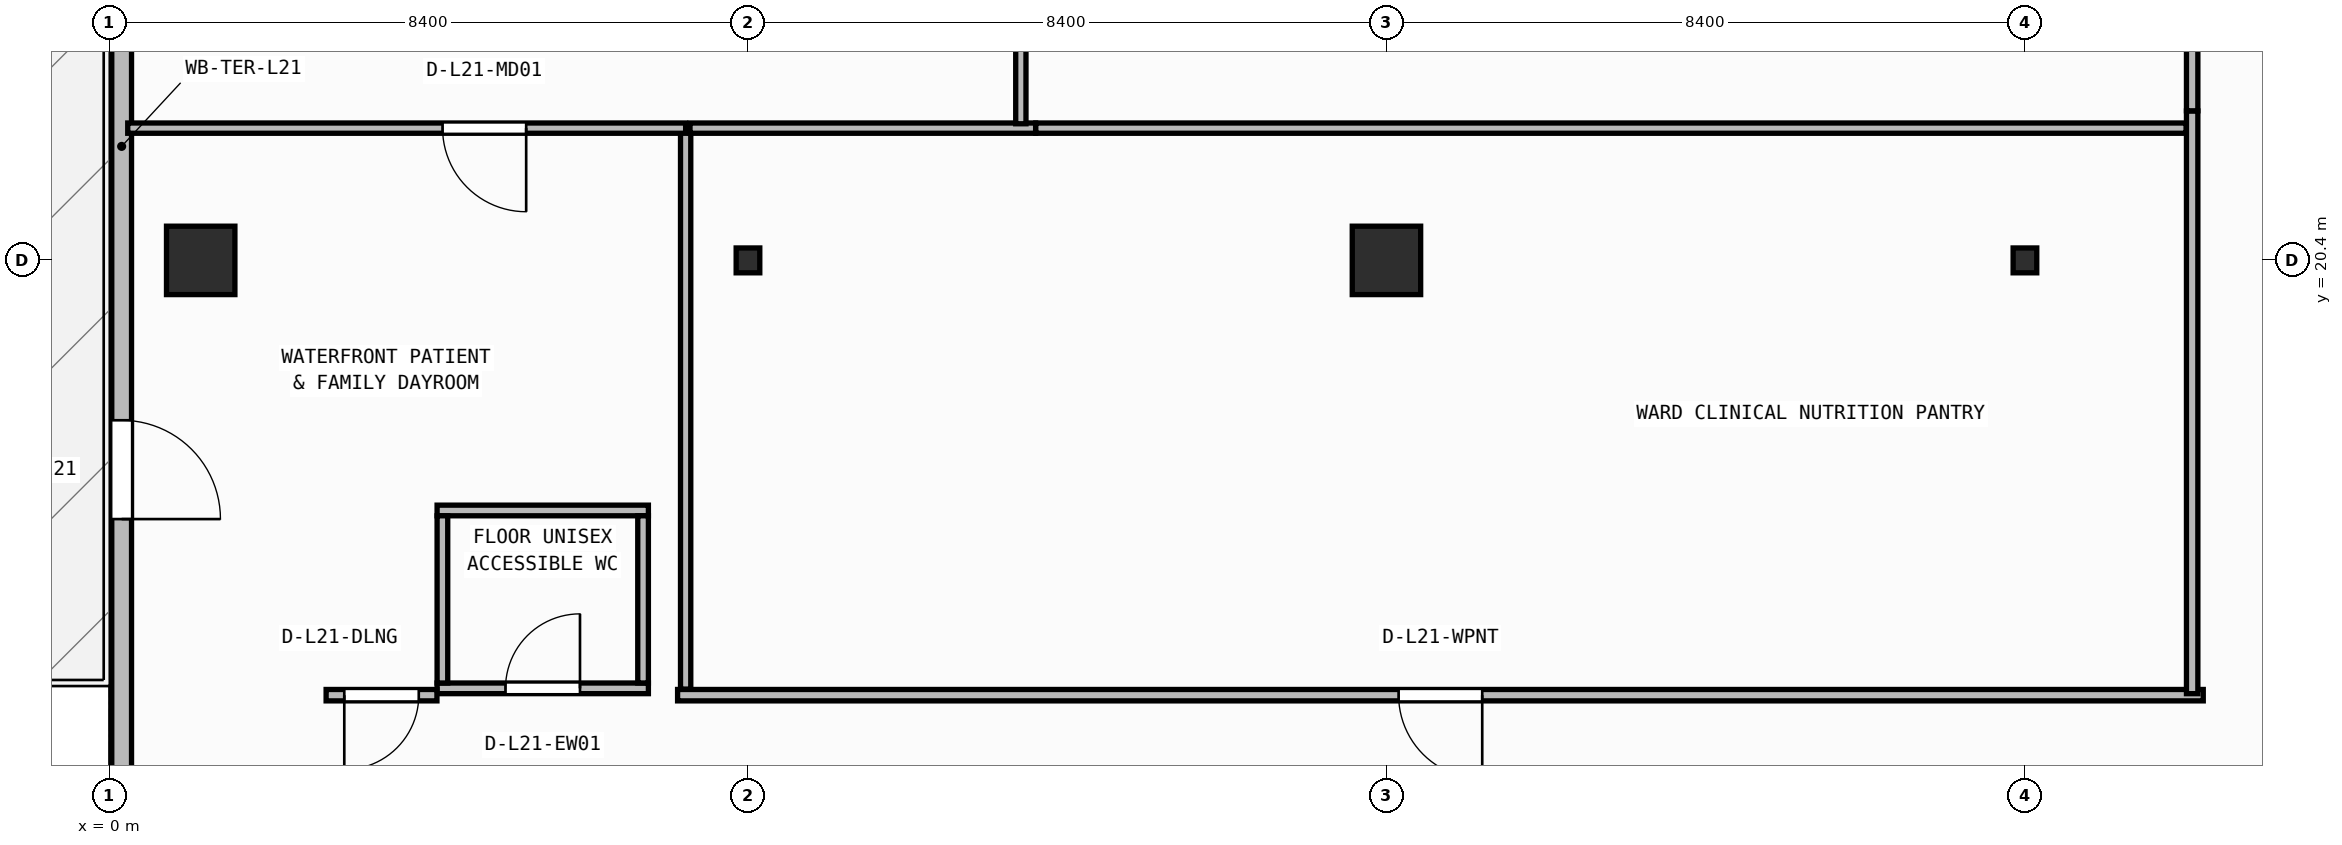
"""IFC4 building model, lengths in metres.
Left out: names, types, materials, properties, quantities, classifications, styles, units other than length and angle.
Written with IfcOpenShell. Run it as: python <this file> out.ifc"""

import sys

from ifc_helpers import new_model, si_unit, direction, frame, frame_2d, origin, origin_2d, place, context, subcontext, project, spatial, rectangle, i_section, extrude, element, fill, save


model = new_model("IFC4")
c1 = context("Model", 3, precision=1e-05, world=origin(), true_north=direction((0.0, 1.0)))
c2 = subcontext(c1, "Body", "Model", "MODEL_VIEW")
j1 = project(units=[si_unit("LENGTHUNIT", "METRE"), si_unit("PLANEANGLEUNIT", "RADIAN")], contexts=[c1])
p1 = place(None, origin())
s1 = spatial("IfcSite", under=j1, at=p1, CompositionType="ELEMENT")
p2 = place(p1, origin())
s2 = spatial("IfcBuilding", under=s1, at=p2, CompositionType="ELEMENT")
p3 = place(p2, frame((0.0, 0.0, 85.7)))
s3 = spatial("IfcBuildingStorey", under=s2, at=p3, CompositionType="ELEMENT", Elevation=85.7)
p4 = place(p3, frame((1.2, 20.4, 0.0), z_axis=(0.0, 0.0, 1.0), x_axis=(1.0, 0.0, 0.0)))
e1 = element("IfcColumn", 1, at=p4, inside=s3, PredefinedType="COLUMN", context=c2, shape_type="SweptSolid", body=[
    extrude(rectangle(XDim=0.9, YDim=0.9, at=origin_2d()), origin(), (0.0, 0.0, 1.0), 3.95),
])
p5 = place(p3, frame((8.4, 20.4, 0.0), z_axis=(0.0, 0.0, 1.0), x_axis=(1.0, 0.0, 0.0)))
e2 = element("IfcColumn", 2, at=p5, inside=s3, PredefinedType="COLUMN", context=c2, shape_type="SweptSolid", body=[
    extrude(i_section(OverallWidth=0.311, OverallDepth=0.327, WebThickness=0.016, FlangeThickness=0.025, FilletRadius=0.017, at=origin_2d()), origin(), (0.0, 0.0, 1.0), 3.95),
])
p6 = place(p3, frame((16.8, 20.4, 0.0), z_axis=(0.0, 0.0, 1.0), x_axis=(1.0, 0.0, 0.0)))
e3 = element("IfcColumn", 3, at=p6, inside=s3, PredefinedType="COLUMN", context=c2, shape_type="SweptSolid", body=[
    extrude(rectangle(XDim=0.9, YDim=0.9, at=origin_2d()), origin(), (0.0, 0.0, 1.0), 3.95),
])
p7 = place(p3, frame((25.2, 20.4, 0.0), z_axis=(0.0, 0.0, 1.0), x_axis=(1.0, 0.0, 0.0)))
e4 = element("IfcColumn", 4, at=p7, inside=s3, PredefinedType="COLUMN", context=c2, shape_type="SweptSolid", body=[
    extrude(i_section(OverallWidth=0.311, OverallDepth=0.327, WebThickness=0.016, FlangeThickness=0.025, FilletRadius=0.017, at=origin_2d()), origin(), (0.0, 0.0, 1.0), 3.95),
])
p8 = place(p3, frame((0.16, 41.04, 0.0), z_axis=(0.0, 0.0, 1.0), x_axis=(0.0, -1.0, 0.0)))
e5 = element("IfcWall", 5, at=p8, inside=s3, PredefinedType="STANDARD", context=c2, shape_type="SweptSolid", body=[
    extrude(rectangle(XDim=38.28, YDim=0.26, at=frame_2d((19.14, 0.0))), origin(), (0.0, 0.0, 1.0), 3.71),
])
p9 = place(p8, frame((22.743, 0.0, 0.0)))
e6 = element("IfcOpeningElement", 6, at=p9, cuts=e5, PredefinedType="OPENING", context=c2, shape_type="SweptSolid", body=[
    extrude(rectangle(XDim=1.3, YDim=2.15, at=frame_2d((0.65, 1.075))), frame((0.0, 0.14, 0.0), z_axis=(0.0, -1.0, 0.0), x_axis=(1.0, 0.0, 0.0)), (0.0, 0.0, 1.0), 0.28),
])
p10 = place(p3, frame((4.31, 14.77, 0.0), z_axis=(0.0, 0.0, 1.0), x_axis=(1.0, 0.0, 0.0)))
e7 = element("IfcWall", 7, at=p10, inside=s3, PredefinedType="PARTITIONING", context=c2, shape_type="SweptSolid", body=[
    extrude(rectangle(XDim=2.78, YDim=0.14, at=frame_2d((1.39, 0.0))), origin(), (0.0, 0.0, 1.0), 3.71),
])
p11 = place(p10, frame((0.9, 0.0, 0.0)))
e8 = element("IfcOpeningElement", 8, at=p11, cuts=e7, PredefinedType="OPENING", context=c2, shape_type="SweptSolid", body=[
    extrude(rectangle(XDim=0.98, YDim=2.1, at=frame_2d((0.49, 1.05))), frame((0.0, 0.08, 0.0), z_axis=(0.0, -1.0, 0.0), x_axis=(1.0, 0.0, 0.0)), (0.0, 0.0, 1.0), 0.16),
])
p12 = place(p3, frame((4.31, 17.11, 0.0), z_axis=(0.0, 0.0, 1.0), x_axis=(1.0, 0.0, 0.0)))
e9 = element("IfcWall", 9, at=p12, inside=s3, PredefinedType="PARTITIONING", context=c2, shape_type="SweptSolid", body=[
    extrude(rectangle(XDim=2.78, YDim=0.14, at=frame_2d((1.39, 0.0))), origin(), (0.0, 0.0, 1.0), 3.71),
])
for number, where, z_axis, x_axis in (
    (10, (4.38, 14.84, 0.0), (0.0, 0.0, 1.0), (0.0, 1.0, 0.0)),
    (11, (7.02, 14.84, 0.0), (0.0, 0.0, 1.0), (0.0, 1.0, 0.0)),
):
    element("IfcWall", number, at=place(p3, frame(where, z_axis=z_axis, x_axis=x_axis)), inside=s3, PredefinedType="PARTITIONING", context=c2, shape_type="SweptSolid", body=[
        extrude(rectangle(XDim=2.2, YDim=0.14, at=frame_2d((1.1, 0.0))), origin(), (0.0, 0.0, 1.0), 3.71),
    ])
p13 = place(p3, frame((4.308, 14.68, 0.0), z_axis=(0.0, 0.0, 1.0), x_axis=(-1.0, 0.0, 0.0)))
e12 = element("IfcWall", 12, at=p13, inside=s3, PredefinedType="PARTITIONING", context=c2, shape_type="SweptSolid", body=[
    extrude(rectangle(XDim=1.458, YDim=0.15, at=frame_2d((0.729, 0.0))), origin(), (0.0, 0.0, 1.0), 3.71),
])
p14 = place(p13, frame((0.239, 0.0, 0.0)))
e13 = element("IfcOpeningElement", 13, at=p14, cuts=e12, PredefinedType="OPENING", context=c2, shape_type="SweptSolid", body=[
    extrude(rectangle(XDim=0.98, YDim=2.1, at=frame_2d((0.49, 1.05))), frame((0.0, 0.085, 0.0), z_axis=(0.0, -1.0, 0.0), x_axis=(1.0, 0.0, 0.0)), (0.0, 0.0, 1.0), 0.17),
])
p15 = place(p3, frame((27.546, 14.68, 0.0), z_axis=(0.0, 0.0, 1.0), x_axis=(-1.0, 0.0, 0.0)))
e14 = element("IfcWall", 14, at=p15, inside=s3, PredefinedType="PARTITIONING", context=c2, shape_type="SweptSolid", body=[
    extrude(rectangle(XDim=20.072, YDim=0.15, at=frame_2d((10.036, 0.0))), origin(), (0.0, 0.0, 1.0), 3.71),
])
p16 = place(p15, frame((9.486, 0.0, 0.0)))
e15 = element("IfcOpeningElement", 15, at=p16, cuts=e14, PredefinedType="OPENING", context=c2, shape_type="SweptSolid", body=[
    extrude(rectangle(XDim=1.1, YDim=2.1, at=frame_2d((0.55, 1.05))), frame((0.0, 0.085, 0.0), z_axis=(0.0, -1.0, 0.0), x_axis=(1.0, 0.0, 0.0)), (0.0, 0.0, 1.0), 0.17),
])
p17 = place(p3, frame((27.4, 22.366, 0.0), z_axis=(0.0, 0.0, 1.0), x_axis=(0.0, -1.0, 0.0)))
e16 = element("IfcWall", 16, at=p17, inside=s3, PredefinedType="PARTITIONING", context=c2, shape_type="SweptSolid", body=[
    extrude(rectangle(XDim=7.666, YDim=0.15, at=frame_2d((3.833, 0.0))), origin(), (0.0, 0.0, 1.0), 3.71),
])
p18 = place(p3, frame((27.4, 29.6, 0.0), z_axis=(0.0, 0.0, 1.0), x_axis=(0.0, -1.0, 0.0)))
e17 = element("IfcWall", 17, at=p18, inside=s3, PredefinedType="PARTITIONING", context=c2, shape_type="SweptSolid", body=[
    extrude(rectangle(XDim=7.232, YDim=0.15, at=frame_2d((3.616, 0.0))), origin(), (0.0, 0.0, 1.0), 3.71),
])
p19 = place(p18, frame((4.499, 0.0, 0.0)))
e18 = element("IfcOpeningElement", 18, at=p19, cuts=e17, PredefinedType="OPENING", context=c2, shape_type="SweptSolid", body=[
    extrude(rectangle(XDim=1.1, YDim=2.1, at=frame_2d((0.55, 1.05))), frame((0.0, 0.085, 0.0), z_axis=(0.0, -1.0, 0.0), x_axis=(1.0, 0.0, 0.0)), (0.0, 0.0, 1.0), 0.17),
])
p20 = place(p3, frame((7.58, 14.76, 0.0), z_axis=(0.0, 0.0, 1.0), x_axis=(0.0, 1.0, 0.0)))
e19 = element("IfcWall", 19, at=p20, inside=s3, PredefinedType="PARTITIONING", context=c2, shape_type="SweptSolid", body=[
    extrude(rectangle(XDim=7.38, YDim=0.135, at=frame_2d((3.69, 0.0))), origin(), (0.0, 0.0, 1.0), 3.71),
])
p21 = place(p3, frame((7.58, 22.14, 0.0), z_axis=(0.0, 0.0, 1.0), x_axis=(-1.0, 0.0, 0.0)))
e20 = element("IfcWall", 20, at=p21, inside=s3, PredefinedType="PARTITIONING", context=c2, shape_type="SweptSolid", body=[
    extrude(rectangle(XDim=7.34, YDim=0.135, at=frame_2d((3.67, 0.0))), origin(), (0.0, 0.0, 1.0), 3.71),
])
p22 = place(p21, frame((2.098, 0.0, 0.0)))
e21 = element("IfcOpeningElement", 21, at=p22, cuts=e20, PredefinedType="OPENING", context=c2, shape_type="SweptSolid", body=[
    extrude(rectangle(XDim=1.1, YDim=2.1, at=frame_2d((0.55, 1.05))), frame((0.0, 0.077, 0.0), z_axis=(0.0, -1.0, 0.0), x_axis=(1.0, 0.0, 0.0)), (0.0, 0.0, 1.0), 0.155),
])
p23 = place(p3, frame((12.185, 22.14, 0.0), z_axis=(0.0, 0.0, 1.0), x_axis=(-1.0, 0.0, 0.0)))
e22 = element("IfcWall", 22, at=p23, inside=s3, PredefinedType="PARTITIONING", context=c2, shape_type="SweptSolid", body=[
    extrude(rectangle(XDim=4.547, YDim=0.135, at=frame_2d((2.273, 0.0))), origin(), (0.0, 0.0, 1.0), 3.71),
])
p24 = place(p3, frame((27.32, 22.14, 0.0), z_axis=(0.0, 0.0, 1.0), x_axis=(-1.0, 0.0, 0.0)))
e23 = element("IfcWall", 23, at=p24, inside=s3, PredefinedType="PARTITIONING", context=c2, shape_type="SweptSolid", body=[
    extrude(rectangle(XDim=15.134, YDim=0.135, at=frame_2d((7.567, 0.0))), origin(), (0.0, 0.0, 1.0), 3.71),
])
p25 = place(p3, frame((11.99, 22.198, 0.0), z_axis=(0.0, 0.0, 1.0), x_axis=(0.0, 1.0, 0.0)))
e24 = element("IfcWall", 24, at=p25, inside=s3, PredefinedType="PARTITIONING", context=c2, shape_type="SweptSolid", body=[
    extrude(rectangle(XDim=7.323, YDim=0.135, at=frame_2d((3.661, 0.0))), origin(), (0.0, 0.0, 1.0), 3.71),
])
p26 = place(p9, origin())
e25 = element("IfcDoor", 25, at=p26, inside=s3, OperationType="SINGLE_SWING_RIGHT", PredefinedType="DOOR", context=c2, shape_type="SweptSolid", body=[
    extrude(rectangle(XDim=1.3, YDim=2.15, at=frame_2d((0.65, 1.075))), frame((0.0, 0.025, 0.0), z_axis=(0.0, -1.0, 0.0), x_axis=(1.0, 0.0, 0.0)), (0.0, 0.0, 1.0), 0.05),
])
fill(e6, e25)
p27 = place(p11, origin())
e26 = element("IfcDoor", 26, at=p27, inside=s3, OperationType="SINGLE_SWING_RIGHT", PredefinedType="DOOR", context=c2, shape_type="SweptSolid", body=[
    extrude(rectangle(XDim=0.98, YDim=2.1, at=frame_2d((0.49, 1.05))), frame((0.0, 0.025, 0.0), z_axis=(0.0, -1.0, 0.0), x_axis=(1.0, 0.0, 0.0)), (0.0, 0.0, 1.0), 0.05),
])
fill(e8, e26)
p28 = place(p14, origin())
e27 = element("IfcDoor", 27, at=p28, inside=s3, OperationType="SINGLE_SWING_RIGHT", PredefinedType="DOOR", context=c2, shape_type="SweptSolid", body=[
    extrude(rectangle(XDim=0.98, YDim=2.1, at=frame_2d((0.49, 1.05))), frame((0.0, 0.025, 0.0), z_axis=(0.0, -1.0, 0.0), x_axis=(1.0, 0.0, 0.0)), (0.0, 0.0, 1.0), 0.05),
])
fill(e13, e27)
p29 = place(p16, origin())
e28 = element("IfcDoor", 28, at=p29, inside=s3, OperationType="SINGLE_SWING_LEFT", PredefinedType="DOOR", context=c2, shape_type="SweptSolid", body=[
    extrude(rectangle(XDim=1.1, YDim=2.1, at=frame_2d((0.55, 1.05))), frame((0.0, 0.025, 0.0), z_axis=(0.0, -1.0, 0.0), x_axis=(1.0, 0.0, 0.0)), (0.0, 0.0, 1.0), 0.05),
])
fill(e15, e28)
p30 = place(p22, origin())
e29 = element("IfcDoor", 29, at=p30, inside=s3, OperationType="SINGLE_SWING_LEFT", PredefinedType="DOOR", context=c2, shape_type="SweptSolid", body=[
    extrude(rectangle(XDim=1.1, YDim=2.1, at=frame_2d((0.55, 1.05))), frame((0.0, 0.025, 0.0), z_axis=(0.0, -1.0, 0.0), x_axis=(1.0, 0.0, 0.0)), (0.0, 0.0, 1.0), 0.05),
])
fill(e21, e29)
save(model, sys.argv[1])
